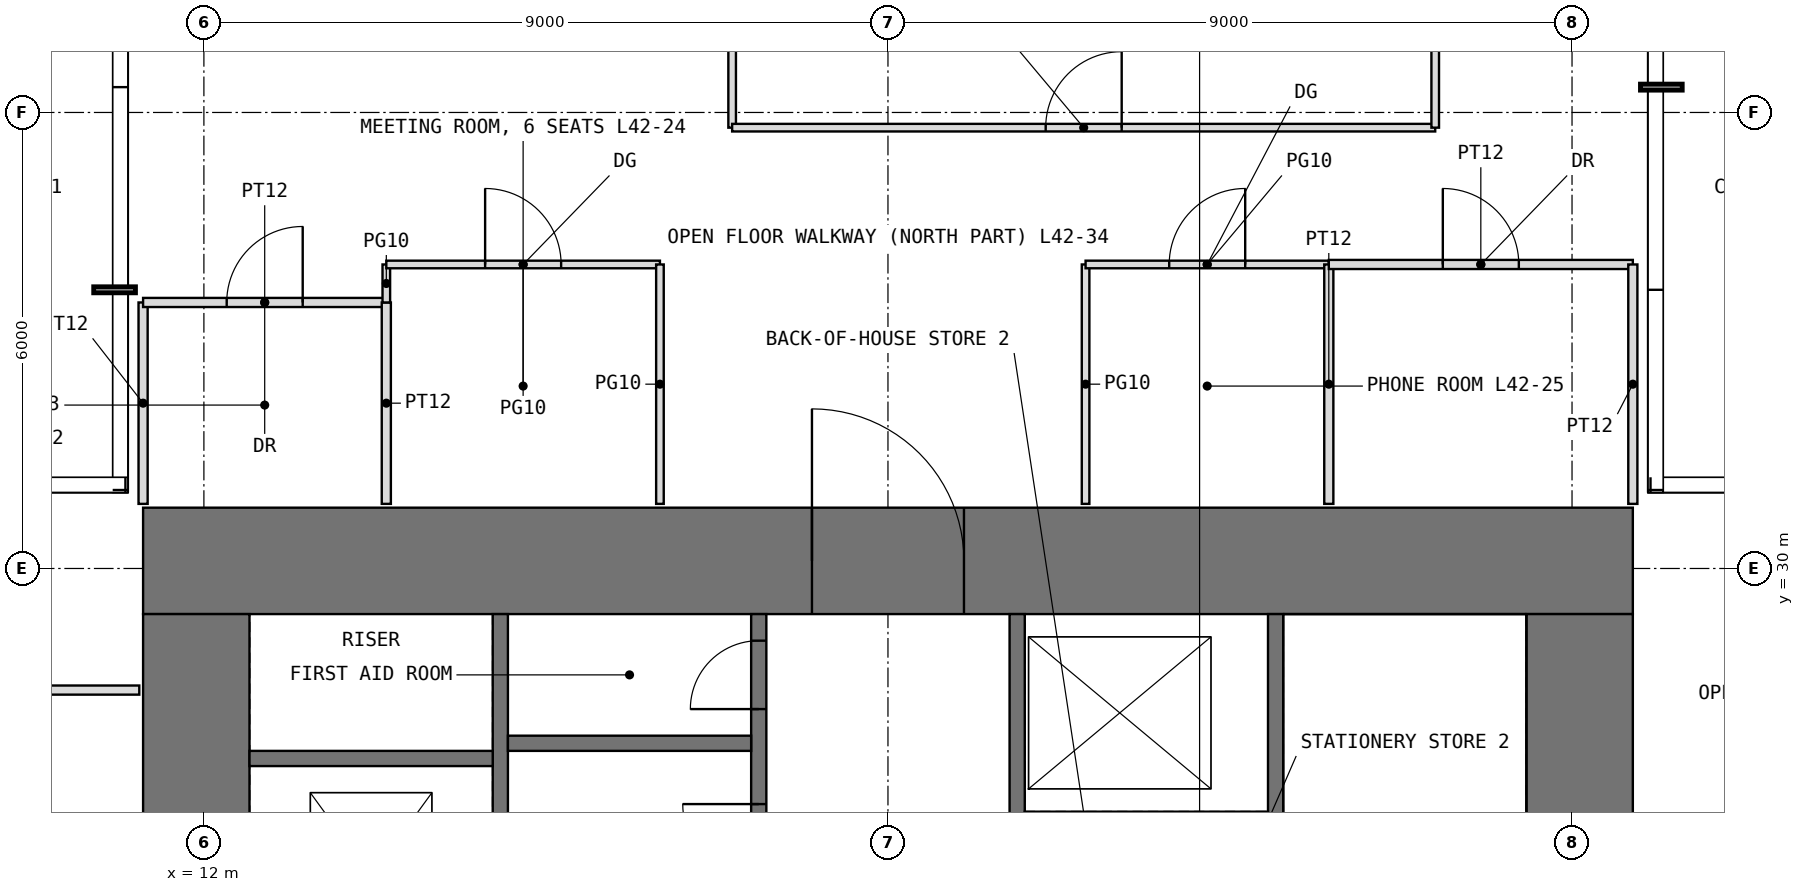
"""IFC4 building model, lengths in metres.
Left out: names, types, materials, properties, quantities, classifications, styles, units other than length and angle.
Written with IfcOpenShell. Run it as: python <this file> out.ifc"""

import sys

from ifc_helpers import new_model, si_unit, direction, frame, frame_2d, origin, place, context, subcontext, project, spatial, rectangle, extrude, element, fill, save


model = new_model("IFC4")
c1 = context("Model", 3, precision=1e-05, world=origin(), true_north=direction((0.0, 1.0)))
c2 = subcontext(c1, "Body", "Model", "MODEL_VIEW")
j1 = project(units=[si_unit("LENGTHUNIT", "METRE"), si_unit("PLANEANGLEUNIT", "RADIAN")], contexts=[c1])
p1 = place(None, origin())
s1 = spatial("IfcSite", under=j1, at=p1, CompositionType="ELEMENT")
p2 = place(p1, origin())
s2 = spatial("IfcBuilding", under=s1, at=p2, CompositionType="ELEMENT")
p3 = place(p2, frame((0.0, 0.0, 178.5)))
s3 = spatial("IfcBuildingStorey", under=s2, at=p3, CompositionType="ELEMENT", Elevation=178.5)
p4 = place(p3, frame((11.2, 30.1, -0.05), z_axis=(0.0, 0.0, 1.0), x_axis=(1.0, 0.0, 0.0)))
e1 = element("IfcWall", 1, at=p4, inside=s3, PredefinedType="SHEAR", context=c2, shape_type="SweptSolid", body=[
    extrude(rectangle(XDim=19.6, YDim=1.4, at=frame_2d((9.8, 0.0))), origin(), (0.0, 0.0, 1.0), 4.0),
])
p5 = place(p4, frame((8.8, 0.0, 0.05)))
e2 = element("IfcOpeningElement", 2, at=p5, cuts=e1, PredefinedType="OPENING", context=c2, shape_type="SweptSolid", body=[
    extrude(rectangle(XDim=2.0, YDim=2.2, at=frame_2d((1.0, 1.1))), frame((0.0, 0.71, 0.0), z_axis=(0.0, -1.0, 0.0), x_axis=(1.0, 0.0, 0.0)), (0.0, 0.0, 1.0), 1.42),
])
p6 = place(p3, frame((11.9, 12.6, -0.05), z_axis=(0.0, 0.0, 1.0), x_axis=(0.0, 1.0, 0.0)))
e3 = element("IfcWall", 3, at=p6, inside=s3, PredefinedType="SHEAR", context=c2, shape_type="SweptSolid", body=[
    extrude(rectangle(XDim=16.8, YDim=1.4, at=frame_2d((8.4, 0.0))), origin(), (0.0, 0.0, 1.0), 4.0),
])
p7 = place(p6, frame((9.9, 0.0, 0.05)))
e4 = element("IfcOpeningElement", 4, at=p7, cuts=e3, PredefinedType="OPENING", context=c2, shape_type="SweptSolid", body=[
    extrude(rectangle(XDim=1.0, YDim=2.2, at=frame_2d((0.5, 1.1))), frame((0.0, 0.71, 0.0), z_axis=(0.0, -1.0, 0.0), x_axis=(1.0, 0.0, 0.0)), (0.0, 0.0, 1.0), 1.42),
])
p8 = place(p3, frame((30.1, 12.6, -0.05), z_axis=(0.0, 0.0, 1.0), x_axis=(0.0, 1.0, 0.0)))
e5 = element("IfcWall", 5, at=p8, inside=s3, PredefinedType="SHEAR", context=c2, shape_type="SweptSolid", body=[
    extrude(rectangle(XDim=16.8, YDim=1.4, at=frame_2d((8.4, 0.0))), origin(), (0.0, 0.0, 1.0), 4.0),
])
p9 = place(p8, frame((5.9, 0.0, 0.05)))
e6 = element("IfcOpeningElement", 6, at=p9, cuts=e5, PredefinedType="OPENING", context=c2, shape_type="SweptSolid", body=[
    extrude(rectangle(XDim=1.0, YDim=2.2, at=frame_2d((0.5, 1.1))), frame((0.0, 0.71, 0.0), z_axis=(0.0, -1.0, 0.0), x_axis=(1.0, 0.0, 0.0)), (0.0, 0.0, 1.0), 1.42),
])
p10 = place(p3, frame((15.9, 12.6, -0.05), z_axis=(0.0, 0.0, 1.0), x_axis=(0.0, 1.0, 0.0)))
e7 = element("IfcWall", 7, at=p10, inside=s3, PredefinedType="SHEAR", context=c2, shape_type="SweptSolid", body=[
    extrude(rectangle(XDim=16.8, YDim=0.2, at=frame_2d((8.4, 0.0))), origin(), (0.0, 0.0, 1.0), 4.0),
])
p11 = place(p10, frame((8.9, 0.0, 0.05)))
e8 = element("IfcOpeningElement", 8, at=p11, cuts=e7, PredefinedType="OPENING", context=c2, shape_type="SweptSolid", body=[
    extrude(rectangle(XDim=1.0, YDim=2.2, at=frame_2d((0.5, 1.1))), frame((0.0, 0.11, 0.0), z_axis=(0.0, -1.0, 0.0), x_axis=(1.0, 0.0, 0.0)), (0.0, 0.0, 1.0), 0.22),
])
p12 = place(p3, frame((19.3, 12.6, -0.05), z_axis=(0.0, 0.0, 1.0), x_axis=(0.0, 1.0, 0.0)))
e9 = element("IfcWall", 9, at=p12, inside=s3, PredefinedType="SHEAR", context=c2, shape_type="SweptSolid", body=[
    extrude(rectangle(XDim=16.8, YDim=0.2, at=frame_2d((8.4, 0.0))), origin(), (0.0, 0.0, 1.0), 4.0),
])
p13 = place(p12, frame((8.7, 0.0, 0.05)))
e10 = element("IfcOpeningElement", 10, at=p13, cuts=e9, PredefinedType="OPENING", context=c2, shape_type="SweptSolid", body=[
    extrude(rectangle(XDim=1.0, YDim=2.2, at=frame_2d((0.5, 1.1))), frame((0.0, 0.11, 0.0), z_axis=(0.0, -1.0, 0.0), x_axis=(1.0, 0.0, 0.0)), (0.0, 0.0, 1.0), 0.22),
])
p14 = place(p12, frame((10.85, 0.0, 0.05)))
e11 = element("IfcOpeningElement", 11, at=p14, cuts=e9, PredefinedType="OPENING", context=c2, shape_type="SweptSolid", body=[
    extrude(rectangle(XDim=0.9, YDim=2.2, at=frame_2d((0.45, 1.1))), frame((0.0, 0.11, 0.0), z_axis=(0.0, -1.0, 0.0), x_axis=(1.0, 0.0, 0.0)), (0.0, 0.0, 1.0), 0.22),
])
p15 = place(p12, frame((13.3, 0.0, 0.05)))
e12 = element("IfcOpeningElement", 12, at=p15, cuts=e9, PredefinedType="OPENING", context=c2, shape_type="SweptSolid", body=[
    extrude(rectangle(XDim=1.0, YDim=2.2, at=frame_2d((0.5, 1.1))), frame((0.0, 0.11, 0.0), z_axis=(0.0, -1.0, 0.0), x_axis=(1.0, 0.0, 0.0)), (0.0, 0.0, 1.0), 0.22),
])
p16 = place(p12, frame((15.55, 0.0, 0.05)))
e13 = element("IfcOpeningElement", 13, at=p16, cuts=e9, PredefinedType="OPENING", context=c2, shape_type="SweptSolid", body=[
    extrude(rectangle(XDim=0.9, YDim=2.2, at=frame_2d((0.45, 1.1))), frame((0.0, 0.11, 0.0), z_axis=(0.0, -1.0, 0.0), x_axis=(1.0, 0.0, 0.0)), (0.0, 0.0, 1.0), 0.22),
])
p17 = place(p12, frame((0.75, 0.0, 0.05)))
e14 = element("IfcOpeningElement", 14, at=p17, cuts=e9, PredefinedType="OPENING", context=c2, shape_type="SweptSolid", body=[
    extrude(rectangle(XDim=1.1, YDim=2.2, at=frame_2d((0.55, 1.1))), frame((0.0, 0.11, 0.0), z_axis=(0.0, -1.0, 0.0), x_axis=(1.0, 0.0, 0.0)), (0.0, 0.0, 1.0), 0.22),
])
p18 = place(p12, frame((3.55, 0.0, 0.05)))
e15 = element("IfcOpeningElement", 15, at=p18, cuts=e9, PredefinedType="OPENING", context=c2, shape_type="SweptSolid", body=[
    extrude(rectangle(XDim=1.1, YDim=2.2, at=frame_2d((0.55, 1.1))), frame((0.0, 0.11, 0.0), z_axis=(0.0, -1.0, 0.0), x_axis=(1.0, 0.0, 0.0)), (0.0, 0.0, 1.0), 0.22),
])
p19 = place(p12, frame((6.35, 0.0, 0.05)))
e16 = element("IfcOpeningElement", 16, at=p19, cuts=e9, PredefinedType="OPENING", context=c2, shape_type="SweptSolid", body=[
    extrude(rectangle(XDim=1.1, YDim=2.2, at=frame_2d((0.55, 1.1))), frame((0.0, 0.11, 0.0), z_axis=(0.0, -1.0, 0.0), x_axis=(1.0, 0.0, 0.0)), (0.0, 0.0, 1.0), 0.22),
])
p20 = place(p3, frame((22.7, 12.6, -0.05), z_axis=(0.0, 0.0, 1.0), x_axis=(0.0, 1.0, 0.0)))
e17 = element("IfcWall", 17, at=p20, inside=s3, PredefinedType="SHEAR", context=c2, shape_type="SweptSolid", body=[
    extrude(rectangle(XDim=16.8, YDim=0.2, at=frame_2d((8.4, 0.0))), origin(), (0.0, 0.0, 1.0), 4.0),
])
p21 = place(p20, frame((7.1, 0.0, 0.05)))
e18 = element("IfcOpeningElement", 18, at=p21, cuts=e17, PredefinedType="OPENING", context=c2, shape_type="SweptSolid", body=[
    extrude(rectangle(XDim=1.0, YDim=2.2, at=frame_2d((0.5, 1.1))), frame((0.0, 0.11, 0.0), z_axis=(0.0, -1.0, 0.0), x_axis=(1.0, 0.0, 0.0)), (0.0, 0.0, 1.0), 0.22),
])
p22 = place(p20, frame((1.55, 0.0, 0.05)))
e19 = element("IfcOpeningElement", 19, at=p22, cuts=e17, PredefinedType="OPENING", context=c2, shape_type="SweptSolid", body=[
    extrude(rectangle(XDim=0.9, YDim=2.2, at=frame_2d((0.45, 1.1))), frame((0.0, 0.11, 0.0), z_axis=(0.0, -1.0, 0.0), x_axis=(1.0, 0.0, 0.0)), (0.0, 0.0, 1.0), 0.22),
])
p23 = place(p20, frame((4.95, 0.0, 0.05)))
e20 = element("IfcOpeningElement", 20, at=p23, cuts=e17, PredefinedType="OPENING", context=c2, shape_type="SweptSolid", body=[
    extrude(rectangle(XDim=0.9, YDim=2.2, at=frame_2d((0.45, 1.1))), frame((0.0, 0.11, 0.0), z_axis=(0.0, -1.0, 0.0), x_axis=(1.0, 0.0, 0.0)), (0.0, 0.0, 1.0), 0.22),
])
p24 = place(p20, frame((9.4, 0.0, 0.05)))
e21 = element("IfcOpeningElement", 21, at=p24, cuts=e17, PredefinedType="OPENING", context=c2, shape_type="SweptSolid", body=[
    extrude(rectangle(XDim=1.0, YDim=2.2, at=frame_2d((0.5, 1.1))), frame((0.0, 0.11, 0.0), z_axis=(0.0, -1.0, 0.0), x_axis=(1.0, 0.0, 0.0)), (0.0, 0.0, 1.0), 0.22),
])
p25 = place(p20, frame((12.2, 0.0, 0.05)))
e22 = element("IfcOpeningElement", 22, at=p25, cuts=e17, PredefinedType="OPENING", context=c2, shape_type="SweptSolid", body=[
    extrude(rectangle(XDim=1.0, YDim=2.2, at=frame_2d((0.5, 1.1))), frame((0.0, 0.11, 0.0), z_axis=(0.0, -1.0, 0.0), x_axis=(1.0, 0.0, 0.0)), (0.0, 0.0, 1.0), 0.22),
])
p26 = place(p3, frame((26.1, 12.6, -0.05), z_axis=(0.0, 0.0, 1.0), x_axis=(0.0, 1.0, 0.0)))
e23 = element("IfcWall", 23, at=p26, inside=s3, PredefinedType="SHEAR", context=c2, shape_type="SweptSolid", body=[
    extrude(rectangle(XDim=16.8, YDim=0.2, at=frame_2d((8.4, 0.0))), origin(), (0.0, 0.0, 1.0), 4.0),
])
p27 = place(p26, frame((6.9, 0.0, 0.05)))
e24 = element("IfcOpeningElement", 24, at=p27, cuts=e23, PredefinedType="OPENING", context=c2, shape_type="SweptSolid", body=[
    extrude(rectangle(XDim=1.0, YDim=2.2, at=frame_2d((0.5, 1.1))), frame((0.0, 0.11, 0.0), z_axis=(0.0, -1.0, 0.0), x_axis=(1.0, 0.0, 0.0)), (0.0, 0.0, 1.0), 0.22),
])
for number, where, z_axis, x_axis in (
    (25, (12.6, 27.5, -0.05), (0.0, 0.0, 1.0), (1.0, 0.0, 0.0)),
    (26, (16.0, 27.7, -0.05), (0.0, 0.0, 1.0), (1.0, 0.0, 0.0)),
):
    element("IfcWall", number, at=place(p3, frame(where, z_axis=z_axis, x_axis=x_axis)), inside=s3, PredefinedType="SHEAR", context=c2, shape_type="SweptSolid", body=[
        extrude(rectangle(XDim=3.2, YDim=0.2, at=frame_2d((1.6, 0.0))), origin(), (0.0, 0.0, 1.0), 4.0),
    ])
p28 = place(p3, frame((7.0, 28.4, 0.0), z_axis=(0.0, 0.0, 1.0), x_axis=(1.0, 0.0, 0.0)))
e27 = element("IfcWall", 27, at=p28, inside=s3, PredefinedType="PARTITIONING", context=c2, shape_type="SweptSolid", body=[
    extrude(rectangle(XDim=4.15, YDim=0.12, at=frame_2d((2.075, 0.0))), origin(), (0.0, 0.0, 1.0), 3.75),
])
p29 = place(p3, frame((11.2, 30.85, 0.0), z_axis=(0.0, 0.0, 1.0), x_axis=(0.0, 1.0, 0.0)))
e28 = element("IfcWall", 28, at=p29, inside=s3, PredefinedType="PARTITIONING", context=c2, shape_type="SweptSolid", body=[
    extrude(rectangle(XDim=2.65, YDim=0.12, at=frame_2d((1.325, 0.0))), origin(), (0.0, 0.0, 1.0), 3.75),
])
p30 = place(p3, frame((11.2, 33.5, 0.0), z_axis=(0.0, 0.0, 1.0), x_axis=(1.0, 0.0, 0.0)))
e29 = element("IfcWall", 29, at=p30, inside=s3, PredefinedType="PARTITIONING", context=c2, shape_type="SweptSolid", body=[
    extrude(rectangle(XDim=3.2, YDim=0.12, at=frame_2d((1.6, 0.0))), origin(), (0.0, 0.0, 1.0), 3.75),
])
p31 = place(p30, frame((1.1, 0.0, 0.0)))
e30 = element("IfcOpeningElement", 30, at=p31, cuts=e29, PredefinedType="OPENING", context=c2, shape_type="SweptSolid", body=[
    extrude(rectangle(XDim=1.0, YDim=2.2, at=frame_2d((0.5, 1.1))), frame((0.0, 0.07, 0.0), z_axis=(0.0, -1.0, 0.0), x_axis=(1.0, 0.0, 0.0)), (0.0, 0.0, 1.0), 0.14),
])
p32 = place(p3, frame((14.4, 30.85, 0.0), z_axis=(0.0, 0.0, 1.0), x_axis=(0.0, 1.0, 0.0)))
e31 = element("IfcWall", 31, at=p32, inside=s3, PredefinedType="PARTITIONING", context=c2, shape_type="SweptSolid", body=[
    extrude(rectangle(XDim=2.65, YDim=0.12, at=frame_2d((1.325, 0.0))), origin(), (0.0, 0.0, 1.0), 3.75),
])
p33 = place(p3, frame((14.4, 33.5, 0.0), z_axis=(0.0, 0.0, 1.0), x_axis=(0.0, 1.0, 0.0)))
e32 = element("IfcWall", 32, at=p33, inside=s3, PredefinedType="PARTITIONING", context=c2, shape_type="SweptSolid", body=[
    extrude(rectangle(XDim=0.5, YDim=0.1, at=frame_2d((0.25, 0.0))), origin(), (0.0, 0.0, 1.0), 3.75),
])
p34 = place(p3, frame((14.4, 34.0, 0.0), z_axis=(0.0, 0.0, 1.0), x_axis=(1.0, 0.0, 0.0)))
e33 = element("IfcWall", 33, at=p34, inside=s3, PredefinedType="PARTITIONING", context=c2, shape_type="SweptSolid", body=[
    extrude(rectangle(XDim=3.6, YDim=0.1, at=frame_2d((1.8, 0.0))), origin(), (0.0, 0.0, 1.0), 3.75),
])
p35 = place(p34, frame((1.3, 0.0, 0.0)))
e34 = element("IfcOpeningElement", 34, at=p35, cuts=e33, PredefinedType="OPENING", context=c2, shape_type="SweptSolid", body=[
    extrude(rectangle(XDim=1.0, YDim=2.4, at=frame_2d((0.5, 1.2))), frame((0.0, 0.06, 0.0), z_axis=(0.0, -1.0, 0.0), x_axis=(1.0, 0.0, 0.0)), (0.0, 0.0, 1.0), 0.12),
])
p36 = place(p3, frame((18.0, 30.85, 0.0), z_axis=(0.0, 0.0, 1.0), x_axis=(0.0, 1.0, 0.0)))
e35 = element("IfcWall", 35, at=p36, inside=s3, PredefinedType="PARTITIONING", context=c2, shape_type="SweptSolid", body=[
    extrude(rectangle(XDim=3.15, YDim=0.1, at=frame_2d((1.575, 0.0))), origin(), (0.0, 0.0, 1.0), 3.75),
])
p37 = place(p3, frame((18.95, 35.8, 0.0), z_axis=(0.0, 0.0, 1.0), x_axis=(0.0, 1.0, 0.0)))
e36 = element("IfcWall", 36, at=p37, inside=s3, PredefinedType="PARTITIONING", context=c2, shape_type="SweptSolid", body=[
    extrude(rectangle(XDim=3.2, YDim=0.1, at=frame_2d((1.6, 0.0))), origin(), (0.0, 0.0, 1.0), 3.75),
])
p38 = place(p3, frame((18.95, 35.8, 0.0), z_axis=(0.0, 0.0, 1.0), x_axis=(1.0, 0.0, 0.0)))
e37 = element("IfcWall", 37, at=p38, inside=s3, PredefinedType="PARTITIONING", context=c2, shape_type="SweptSolid", body=[
    extrude(rectangle(XDim=9.25, YDim=0.1, at=frame_2d((4.625, 0.0))), origin(), (0.0, 0.0, 1.0), 3.75),
])
p39 = place(p38, frame((4.125, 0.0, 0.0)))
e38 = element("IfcOpeningElement", 38, at=p39, cuts=e37, PredefinedType="OPENING", context=c2, shape_type="SweptSolid", body=[
    extrude(rectangle(XDim=1.0, YDim=2.4, at=frame_2d((0.5, 1.2))), frame((0.0, 0.06, 0.0), z_axis=(0.0, -1.0, 0.0), x_axis=(1.0, 0.0, 0.0)), (0.0, 0.0, 1.0), 0.12),
])
p40 = place(p3, frame((23.6, 30.85, 0.0), z_axis=(0.0, 0.0, 1.0), x_axis=(0.0, 1.0, 0.0)))
e39 = element("IfcWall", 39, at=p40, inside=s3, PredefinedType="PARTITIONING", context=c2, shape_type="SweptSolid", body=[
    extrude(rectangle(XDim=3.15, YDim=0.1, at=frame_2d((1.575, 0.0))), origin(), (0.0, 0.0, 1.0), 3.75),
])
p41 = place(p3, frame((23.6, 34.0, 0.0), z_axis=(0.0, 0.0, 1.0), x_axis=(1.0, 0.0, 0.0)))
e40 = element("IfcWall", 40, at=p41, inside=s3, PredefinedType="PARTITIONING", context=c2, shape_type="SweptSolid", body=[
    extrude(rectangle(XDim=3.2, YDim=0.1, at=frame_2d((1.6, 0.0))), origin(), (0.0, 0.0, 1.0), 3.75),
])
p42 = place(p41, frame((1.1, 0.0, 0.0)))
e41 = element("IfcOpeningElement", 41, at=p42, cuts=e40, PredefinedType="OPENING", context=c2, shape_type="SweptSolid", body=[
    extrude(rectangle(XDim=1.0, YDim=2.4, at=frame_2d((0.5, 1.2))), frame((0.0, 0.06, 0.0), z_axis=(0.0, -1.0, 0.0), x_axis=(1.0, 0.0, 0.0)), (0.0, 0.0, 1.0), 0.12),
])
p43 = place(p3, frame((26.8, 30.85, 0.0), z_axis=(0.0, 0.0, 1.0), x_axis=(0.0, 1.0, 0.0)))
e42 = element("IfcWall", 42, at=p43, inside=s3, PredefinedType="PARTITIONING", context=c2, shape_type="SweptSolid", body=[
    extrude(rectangle(XDim=3.15, YDim=0.12, at=frame_2d((1.575, 0.0))), origin(), (0.0, 0.0, 1.0), 3.75),
])
p44 = place(p3, frame((26.8, 34.0, 0.0), z_axis=(0.0, 0.0, 1.0), x_axis=(1.0, 0.0, 0.0)))
e43 = element("IfcWall", 43, at=p44, inside=s3, PredefinedType="PARTITIONING", context=c2, shape_type="SweptSolid", body=[
    extrude(rectangle(XDim=4.0, YDim=0.12, at=frame_2d((2.0, 0.0))), origin(), (0.0, 0.0, 1.0), 3.75),
])
p45 = place(p44, frame((1.5, 0.0, 0.0)))
e44 = element("IfcOpeningElement", 44, at=p45, cuts=e43, PredefinedType="OPENING", context=c2, shape_type="SweptSolid", body=[
    extrude(rectangle(XDim=1.0, YDim=2.2, at=frame_2d((0.5, 1.1))), frame((0.0, 0.07, 0.0), z_axis=(0.0, -1.0, 0.0), x_axis=(1.0, 0.0, 0.0)), (0.0, 0.0, 1.0), 0.14),
])
p46 = place(p3, frame((28.2, 35.8, 0.0), z_axis=(0.0, 0.0, 1.0), x_axis=(0.0, 1.0, 0.0)))
e45 = element("IfcWall", 45, at=p46, inside=s3, PredefinedType="PARTITIONING", context=c2, shape_type="SweptSolid", body=[
    extrude(rectangle(XDim=3.2, YDim=0.1, at=frame_2d((1.6, 0.0))), origin(), (0.0, 0.0, 1.0), 3.75),
])
p47 = place(p3, frame((30.8, 30.85, 0.0), z_axis=(0.0, 0.0, 1.0), x_axis=(0.0, 1.0, 0.0)))
e46 = element("IfcWall", 46, at=p47, inside=s3, PredefinedType="PARTITIONING", context=c2, shape_type="SweptSolid", body=[
    extrude(rectangle(XDim=3.15, YDim=0.12, at=frame_2d((1.575, 0.0))), origin(), (0.0, 0.0, 1.0), 3.75),
])
p48 = place(p5, origin())
e47 = element("IfcDoor", 47, at=p48, inside=s3, OperationType="DOUBLE_DOOR_SINGLE_SWING", PredefinedType="DOOR", context=c2, shape_type="SweptSolid", body=[
    extrude(rectangle(XDim=2.0, YDim=2.2, at=frame_2d((1.0, 1.1))), frame((0.0, 0.025, 0.0), z_axis=(0.0, -1.0, 0.0), x_axis=(1.0, 0.0, 0.0)), (0.0, 0.0, 1.0), 0.05),
])
fill(e2, e47)
p49 = place(p15, origin())
e48 = element("IfcDoor", 48, at=p49, inside=s3, OperationType="SINGLE_SWING_RIGHT", PredefinedType="DOOR", context=c2, shape_type="SweptSolid", body=[
    extrude(rectangle(XDim=1.0, YDim=2.2, at=frame_2d((0.5, 1.1))), frame((0.0, 0.025, 0.0), z_axis=(0.0, -1.0, 0.0), x_axis=(1.0, 0.0, 0.0)), (0.0, 0.0, 1.0), 0.05),
])
fill(e12, e48)
p50 = place(p16, origin())
e49 = element("IfcDoor", 49, at=p50, inside=s3, OperationType="SINGLE_SWING_LEFT", PredefinedType="DOOR", context=c2, shape_type="SweptSolid", body=[
    extrude(rectangle(XDim=0.9, YDim=2.2, at=frame_2d((0.45, 1.1))), frame((0.0, 0.025, 0.0), z_axis=(0.0, -1.0, 0.0), x_axis=(1.0, 0.0, 0.0)), (0.0, 0.0, 1.0), 0.05),
])
fill(e13, e49)
p51 = place(p31, origin())
e50 = element("IfcDoor", 50, at=p51, inside=s3, OperationType="SINGLE_SWING_RIGHT", PredefinedType="DOOR", context=c2, shape_type="SweptSolid", body=[
    extrude(rectangle(XDim=1.0, YDim=2.2, at=frame_2d((0.5, 1.1))), frame((0.0, 0.025, 0.0), z_axis=(0.0, -1.0, 0.0), x_axis=(1.0, 0.0, 0.0)), (0.0, 0.0, 1.0), 0.05),
])
fill(e30, e50)
p52 = place(p35, origin())
e51 = element("IfcDoor", 51, at=p52, inside=s3, OperationType="SINGLE_SWING_LEFT", PredefinedType="DOOR", context=c2, shape_type="SweptSolid", body=[
    extrude(rectangle(XDim=1.0, YDim=2.4, at=frame_2d((0.5, 1.2))), frame((0.0, 0.025, 0.0), z_axis=(0.0, -1.0, 0.0), x_axis=(1.0, 0.0, 0.0)), (0.0, 0.0, 1.0), 0.05),
])
fill(e34, e51)
p53 = place(p42, origin())
e52 = element("IfcDoor", 52, at=p53, inside=s3, OperationType="SINGLE_SWING_RIGHT", PredefinedType="DOOR", context=c2, shape_type="SweptSolid", body=[
    extrude(rectangle(XDim=1.0, YDim=2.4, at=frame_2d((0.5, 1.2))), frame((0.0, 0.025, 0.0), z_axis=(0.0, -1.0, 0.0), x_axis=(1.0, 0.0, 0.0)), (0.0, 0.0, 1.0), 0.05),
])
fill(e41, e52)
p54 = place(p45, origin())
e53 = element("IfcDoor", 53, at=p54, inside=s3, OperationType="SINGLE_SWING_LEFT", PredefinedType="DOOR", context=c2, shape_type="SweptSolid", body=[
    extrude(rectangle(XDim=1.0, YDim=2.2, at=frame_2d((0.5, 1.1))), frame((0.0, 0.025, 0.0), z_axis=(0.0, -1.0, 0.0), x_axis=(1.0, 0.0, 0.0)), (0.0, 0.0, 1.0), 0.05),
])
fill(e44, e53)
p55 = place(p39, origin())
e54 = element("IfcDoor", 54, at=p55, inside=s3, OperationType="SINGLE_SWING_RIGHT", PredefinedType="DOOR", context=c2, shape_type="SweptSolid", body=[
    extrude(rectangle(XDim=1.0, YDim=2.4, at=frame_2d((0.5, 1.2))), frame((0.0, 0.025, 0.0), z_axis=(0.0, -1.0, 0.0), x_axis=(1.0, 0.0, 0.0)), (0.0, 0.0, 1.0), 0.05),
])
fill(e38, e54)
save(model, sys.argv[1])
